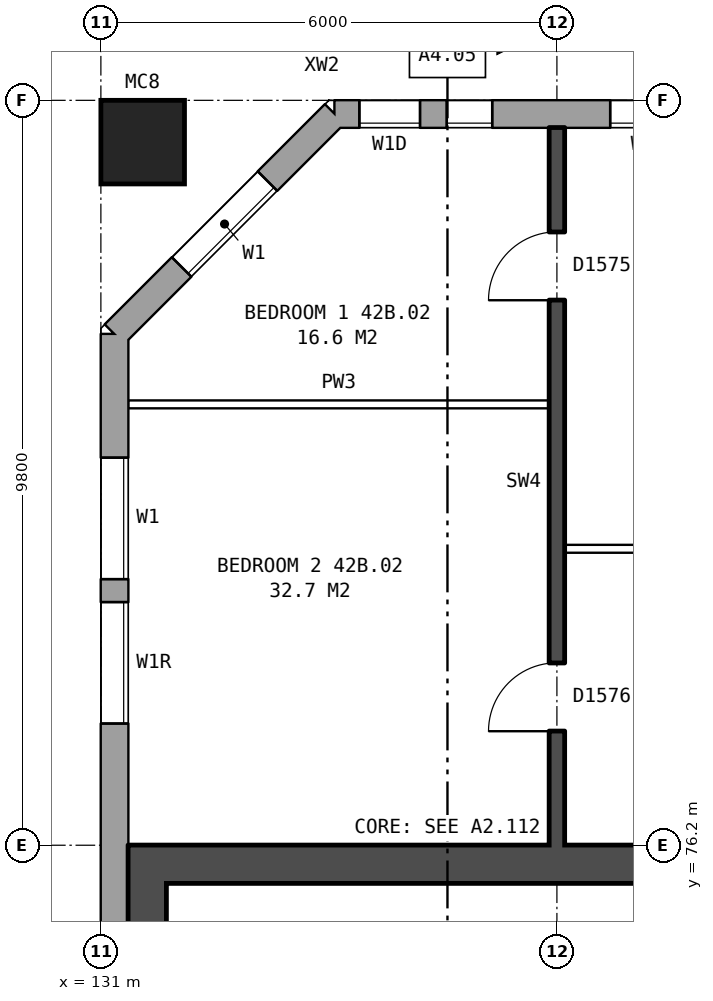
"""IFC4 building model, lengths in metres.
Left out: names, types, materials, properties, quantities, classifications, styles, units other than length and angle.
Written with IfcOpenShell. Run it as: python <this file> out.ifc"""

import sys

from ifc_helpers import new_model, si_unit, direction, frame, frame_2d, origin, origin_2d, place, context, subcontext, project, spatial, rectangle, hollow_rectangle, extrude, element, fill, save


model = new_model("IFC4")
c1 = context("Model", 3, precision=1e-05, world=origin(), true_north=direction((0.0, 1.0)))
c2 = subcontext(c1, "Body", "Model", "MODEL_VIEW")
j1 = project(units=[si_unit("LENGTHUNIT", "METRE"), si_unit("PLANEANGLEUNIT", "RADIAN")], contexts=[c1])
p1 = place(None, origin())
s1 = spatial("IfcSite", under=j1, at=p1, CompositionType="ELEMENT")
p2 = place(p1, origin())
s2 = spatial("IfcBuilding", under=s1, at=p2, CompositionType="ELEMENT")
p3 = place(p2, frame((0.0, 0.0, 151.6)))
s3 = spatial("IfcBuildingStorey", under=s2, at=p3, CompositionType="ELEMENT", Elevation=151.6)
p4 = place(p3, frame((131.55, 85.45, 0.0), z_axis=(0.0, 0.0, 1.0), x_axis=(1.0, 0.0, 0.0)))
e1 = element("IfcColumn", 1, at=p4, inside=s3, PredefinedType="COLUMN", context=c2, shape_type="SweptSolid", body=[
    extrude(hollow_rectangle(XDim=1.1, YDim=1.1, WallThickness=0.06, at=origin_2d()), origin(), (0.0, 0.0, 1.0), 3.1),
])
p5 = place(p3, frame((168.425, 85.82, 0.0), z_axis=(0.0, 0.0, 1.0), x_axis=(-1.0, 0.0, 0.0)))
e2 = element("IfcWall", 2, at=p5, inside=s3, PredefinedType="STANDARD", context=c2, shape_type="SweptSolid", body=[
    extrude(rectangle(XDim=34.351, YDim=0.36, at=frame_2d((17.175, 0.0))), origin(), (0.0, 0.0, 1.0), 2.85),
])
p6 = place(p5, frame((3.225, 0.0, 0.8)))
e3 = element("IfcOpeningElement", 3, at=p6, cuts=e2, PredefinedType="OPENING", context=c2, shape_type="SweptSolid", body=[
    extrude(rectangle(XDim=0.6, YDim=0.9, at=frame_2d((0.3, 0.45))), frame((0.0, 0.19, 0.0), z_axis=(0.0, -1.0, 0.0), x_axis=(1.0, 0.0, 0.0)), (0.0, 0.0, 1.0), 0.38),
])
p7 = place(p5, frame((5.125, 0.0, 0.8)))
e4 = element("IfcOpeningElement", 4, at=p7, cuts=e2, PredefinedType="OPENING", context=c2, shape_type="SweptSolid", body=[
    extrude(rectangle(XDim=1.6, YDim=1.8, at=frame_2d((0.8, 0.9))), frame((0.0, 0.19, 0.0), z_axis=(0.0, -1.0, 0.0), x_axis=(1.0, 0.0, 0.0)), (0.0, 0.0, 1.0), 0.38),
])
p8 = place(p5, frame((8.125, 0.0, 0.8)))
e5 = element("IfcOpeningElement", 5, at=p8, cuts=e2, PredefinedType="OPENING", context=c2, shape_type="SweptSolid", body=[
    extrude(rectangle(XDim=1.6, YDim=1.8, at=frame_2d((0.8, 0.9))), frame((0.0, 0.19, 0.0), z_axis=(0.0, -1.0, 0.0), x_axis=(1.0, 0.0, 0.0)), (0.0, 0.0, 1.0), 0.38),
])
p9 = place(p5, frame((11.125, 0.0, 0.8)))
e6 = element("IfcOpeningElement", 6, at=p9, cuts=e2, PredefinedType="OPENING", context=c2, shape_type="SweptSolid", body=[
    extrude(rectangle(XDim=1.6, YDim=1.8, at=frame_2d((0.8, 0.9))), frame((0.0, 0.19, 0.0), z_axis=(0.0, -1.0, 0.0), x_axis=(1.0, 0.0, 0.0)), (0.0, 0.0, 1.0), 0.38),
])
p10 = place(p5, frame((14.125, 0.0, 0.8)))
e7 = element("IfcOpeningElement", 7, at=p10, cuts=e2, PredefinedType="OPENING", context=c2, shape_type="SweptSolid", body=[
    extrude(rectangle(XDim=1.6, YDim=1.8, at=frame_2d((0.8, 0.9))), frame((0.0, 0.19, 0.0), z_axis=(0.0, -1.0, 0.0), x_axis=(1.0, 0.0, 0.0)), (0.0, 0.0, 1.0), 0.38),
])
p11 = place(p5, frame((17.125, 0.0, 0.8)))
e8 = element("IfcOpeningElement", 8, at=p11, cuts=e2, PredefinedType="OPENING", context=c2, shape_type="SweptSolid", body=[
    extrude(rectangle(XDim=1.6, YDim=1.8, at=frame_2d((0.8, 0.9))), frame((0.0, 0.19, 0.0), z_axis=(0.0, -1.0, 0.0), x_axis=(1.0, 0.0, 0.0)), (0.0, 0.0, 1.0), 0.38),
])
p12 = place(p5, frame((20.125, 0.0, 0.8)))
e9 = element("IfcOpeningElement", 9, at=p12, cuts=e2, PredefinedType="OPENING", context=c2, shape_type="SweptSolid", body=[
    extrude(rectangle(XDim=1.6, YDim=1.8, at=frame_2d((0.8, 0.9))), frame((0.0, 0.19, 0.0), z_axis=(0.0, -1.0, 0.0), x_axis=(1.0, 0.0, 0.0)), (0.0, 0.0, 1.0), 0.38),
])
p13 = place(p5, frame((23.125, 0.0, 0.8)))
e10 = element("IfcOpeningElement", 10, at=p13, cuts=e2, PredefinedType="OPENING", context=c2, shape_type="SweptSolid", body=[
    extrude(rectangle(XDim=1.6, YDim=1.8, at=frame_2d((0.8, 0.9))), frame((0.0, 0.19, 0.0), z_axis=(0.0, -1.0, 0.0), x_axis=(1.0, 0.0, 0.0)), (0.0, 0.0, 1.0), 0.38),
])
p14 = place(p5, frame((26.125, 0.0, 0.8)))
e11 = element("IfcOpeningElement", 11, at=p14, cuts=e2, PredefinedType="OPENING", context=c2, shape_type="SweptSolid", body=[
    extrude(rectangle(XDim=1.6, YDim=1.8, at=frame_2d((0.8, 0.9))), frame((0.0, 0.19, 0.0), z_axis=(0.0, -1.0, 0.0), x_axis=(1.0, 0.0, 0.0)), (0.0, 0.0, 1.0), 0.38),
])
p15 = place(p5, frame((28.025, 0.0, 0.8)))
e12 = element("IfcOpeningElement", 12, at=p15, cuts=e2, PredefinedType="OPENING", context=c2, shape_type="SweptSolid", body=[
    extrude(rectangle(XDim=1.4, YDim=1.8, at=frame_2d((0.7, 0.9))), frame((0.0, 0.19, 0.0), z_axis=(0.0, -1.0, 0.0), x_axis=(1.0, 0.0, 0.0)), (0.0, 0.0, 1.0), 0.38),
])
p16 = place(p5, frame((32.275, 0.0, 1.7)))
e13 = element("IfcOpeningElement", 13, at=p16, cuts=e2, PredefinedType="OPENING", context=c2, shape_type="SweptSolid", body=[
    extrude(rectangle(XDim=0.6, YDim=0.9, at=frame_2d((0.3, 0.45))), frame((0.0, 0.19, 0.0), z_axis=(0.0, -1.0, 0.0), x_axis=(1.0, 0.0, 0.0)), (0.0, 0.0, 1.0), 0.38),
])
p17 = place(p5, frame((4.225, 0.0, 0.8)))
e14 = element("IfcOpeningElement", 14, at=p17, cuts=e2, PredefinedType="OPENING", context=c2, shape_type="SweptSolid", body=[
    extrude(rectangle(XDim=0.6, YDim=1.8, at=frame_2d((0.3, 0.9))), frame((0.0, 0.19, 0.0), z_axis=(0.0, -1.0, 0.0), x_axis=(1.0, 0.0, 0.0)), (0.0, 0.0, 1.0), 0.38),
])
p18 = place(p5, frame((29.725, 0.0, 0.8)))
e15 = element("IfcOpeningElement", 15, at=p18, cuts=e2, PredefinedType="OPENING", context=c2, shape_type="SweptSolid", body=[
    extrude(rectangle(XDim=1.0, YDim=1.2, at=frame_2d((0.5, 0.6))), frame((0.0, 0.19, 0.0), z_axis=(0.0, -1.0, 0.0), x_axis=(1.0, 0.0, 0.0)), (0.0, 0.0, 1.0), 0.38),
])
p19 = place(p5, frame((33.225, 0.0, 0.8)))
e16 = element("IfcOpeningElement", 16, at=p19, cuts=e2, PredefinedType="OPENING", context=c2, shape_type="SweptSolid", body=[
    extrude(rectangle(XDim=0.8, YDim=1.8, at=frame_2d((0.4, 0.9))), frame((0.0, 0.19, 0.0), z_axis=(0.0, -1.0, 0.0), x_axis=(1.0, 0.0, 0.0)), (0.0, 0.0, 1.0), 0.38),
])
p20 = place(p3, frame((134.075, 85.82, 0.0), z_axis=(0.0, 0.0, 1.0), x_axis=(-0.707106781187, -0.707106781187, 0.0)))
e17 = element("IfcWall", 17, at=p20, inside=s3, PredefinedType="STANDARD", context=c2, shape_type="SweptSolid", body=[
    extrude(rectangle(XDim=4.094, YDim=0.36, at=frame_2d((2.047, 0.0))), origin(), (0.0, 0.0, 1.0), 2.85),
])
p21 = place(p20, frame((1.247, 0.0, 0.8)))
e18 = element("IfcOpeningElement", 18, at=p21, cuts=e17, PredefinedType="OPENING", context=c2, shape_type="SweptSolid", body=[
    extrude(rectangle(XDim=1.6, YDim=1.8, at=frame_2d((0.8, 0.9))), frame((0.0, 0.19, 0.0), z_axis=(0.0, -1.0, 0.0), x_axis=(1.0, 0.0, 0.0)), (0.0, 0.0, 1.0), 0.38),
])
p22 = place(p3, frame((131.18, 82.925, 0.0), z_axis=(0.0, 0.0, 1.0), x_axis=(0.0, -1.0, 0.0)))
e19 = element("IfcWall", 19, at=p22, inside=s3, PredefinedType="STANDARD", context=c2, shape_type="SweptSolid", body=[
    extrude(rectangle(XDim=25.851, YDim=0.36, at=frame_2d((12.925, 0.0))), origin(), (0.0, 0.0, 1.0), 2.85),
])
p23 = place(p22, frame((1.625, 0.0, 0.8)))
e20 = element("IfcOpeningElement", 20, at=p23, cuts=e19, PredefinedType="OPENING", context=c2, shape_type="SweptSolid", body=[
    extrude(rectangle(XDim=1.6, YDim=1.8, at=frame_2d((0.8, 0.9))), frame((0.0, 0.19, 0.0), z_axis=(0.0, -1.0, 0.0), x_axis=(1.0, 0.0, 0.0)), (0.0, 0.0, 1.0), 0.38),
])
p24 = place(p22, frame((3.525, 0.0, 1.7)))
e21 = element("IfcOpeningElement", 21, at=p24, cuts=e19, PredefinedType="OPENING", context=c2, shape_type="SweptSolid", body=[
    extrude(rectangle(XDim=1.6, YDim=0.9, at=frame_2d((0.8, 0.45))), frame((0.0, 0.19, 0.0), z_axis=(0.0, -1.0, 0.0), x_axis=(1.0, 0.0, 0.0)), (0.0, 0.0, 1.0), 0.38),
])
p25 = place(p22, frame((20.725, 0.0, 1.7)))
e22 = element("IfcOpeningElement", 22, at=p25, cuts=e19, PredefinedType="OPENING", context=c2, shape_type="SweptSolid", body=[
    extrude(rectangle(XDim=1.6, YDim=0.9, at=frame_2d((0.8, 0.45))), frame((0.0, 0.19, 0.0), z_axis=(0.0, -1.0, 0.0), x_axis=(1.0, 0.0, 0.0)), (0.0, 0.0, 1.0), 0.38),
])
p26 = place(p22, frame((22.625, 0.0, 0.8)))
e23 = element("IfcOpeningElement", 23, at=p26, cuts=e19, PredefinedType="OPENING", context=c2, shape_type="SweptSolid", body=[
    extrude(rectangle(XDim=1.6, YDim=1.8, at=frame_2d((0.8, 0.9))), frame((0.0, 0.19, 0.0), z_axis=(0.0, -1.0, 0.0), x_axis=(1.0, 0.0, 0.0)), (0.0, 0.0, 1.0), 0.38),
])
p27 = place(p3, frame((131.61, 63.8, 0.0), z_axis=(0.0, 0.0, 1.0), x_axis=(0.0, 1.0, 0.0)))
e24 = element("IfcWall", 24, at=p27, inside=s3, PredefinedType="SHEAR", context=c2, shape_type="SweptSolid", body=[
    extrude(rectangle(XDim=12.4, YDim=0.5, at=frame_2d((6.2, 0.0))), origin(), (0.0, 0.0, 1.0), 2.85),
])
p28 = place(p3, frame((139.26, 75.95, 0.0), z_axis=(0.0, 0.0, 1.0), x_axis=(-1.0, 0.0, 0.0)))
e25 = element("IfcWall", 25, at=p28, inside=s3, PredefinedType="SHEAR", context=c2, shape_type="SweptSolid", body=[
    extrude(rectangle(XDim=7.4, YDim=0.5, at=frame_2d((3.7, 0.0))), origin(), (0.0, 0.0, 1.0), 2.85),
])
p29 = place(p3, frame((137.1, 80.1, 0.0), z_axis=(0.0, 0.0, 1.0), x_axis=(1.0, 0.0, 0.0)))
e26 = element("IfcWall", 26, at=p29, inside=s3, PredefinedType="PARTITIONING", context=c2, shape_type="SweptSolid", body=[
    extrude(rectangle(XDim=5.8, YDim=0.1, at=frame_2d((2.9, 0.0))), origin(), (0.0, 0.0, 1.0), 2.85),
])
p30 = place(p29, frame((1.3, 0.0, 0.0)))
e27 = element("IfcOpeningElement", 27, at=p30, cuts=e26, PredefinedType="OPENING", context=c2, shape_type="SweptSolid", body=[
    extrude(rectangle(XDim=0.9, YDim=2.1, at=frame_2d((0.45, 1.05))), frame((0.0, 0.06, 0.0), z_axis=(0.0, -1.0, 0.0), x_axis=(1.0, 0.0, 0.0)), (0.0, 0.0, 1.0), 0.12),
])
p31 = place(p29, frame((4.2, 0.0, 0.0)))
e28 = element("IfcOpeningElement", 28, at=p31, cuts=e26, PredefinedType="OPENING", context=c2, shape_type="SweptSolid", body=[
    extrude(rectangle(XDim=0.9, YDim=2.1, at=frame_2d((0.45, 1.05))), frame((0.0, 0.06, 0.0), z_axis=(0.0, -1.0, 0.0), x_axis=(1.0, 0.0, 0.0)), (0.0, 0.0, 1.0), 0.12),
])
p32 = place(p3, frame((131.36, 82.0, 0.0), z_axis=(0.0, 0.0, 1.0), x_axis=(1.0, 0.0, 0.0)))
e29 = element("IfcWall", 29, at=p32, inside=s3, PredefinedType="PARTITIONING", context=c2, shape_type="SweptSolid", body=[
    extrude(rectangle(XDim=5.54, YDim=0.1, at=frame_2d((2.77, 0.0))), origin(), (0.0, 0.0, 1.0), 2.85),
])
p33 = place(p3, frame((137.0, 76.2, 0.0), z_axis=(0.0, 0.0, 1.0), x_axis=(0.0, 1.0, 0.0)))
e30 = element("IfcWall", 30, at=p33, inside=s3, PredefinedType="SOLIDWALL", context=c2, shape_type="SweptSolid", body=[
    extrude(rectangle(XDim=9.44, YDim=0.2, at=frame_2d((4.72, 0.0))), origin(), (0.0, 0.0, 1.0), 2.85),
])
p34 = place(p33, frame((7.17, 0.0, 0.0)))
e31 = element("IfcOpeningElement", 31, at=p34, cuts=e30, PredefinedType="OPENING", context=c2, shape_type="SweptSolid", body=[
    extrude(rectangle(XDim=0.9, YDim=2.1, at=frame_2d((0.45, 1.05))), frame((0.0, 0.11, 0.0), z_axis=(0.0, -1.0, 0.0), x_axis=(1.0, 0.0, 0.0)), (0.0, 0.0, 1.0), 0.22),
])
p35 = place(p33, frame((1.5, 0.0, 0.0)))
e32 = element("IfcOpeningElement", 32, at=p35, cuts=e30, PredefinedType="OPENING", context=c2, shape_type="SweptSolid", body=[
    extrude(rectangle(XDim=0.9, YDim=2.1, at=frame_2d((0.45, 1.05))), frame((0.0, 0.11, 0.0), z_axis=(0.0, -1.0, 0.0), x_axis=(1.0, 0.0, 0.0)), (0.0, 0.0, 1.0), 0.22),
])
p36 = place(p16, origin())
e33 = element("IfcWindow", 33, at=p36, inside=s3, PartitioningType="SINGLE_PANEL", PredefinedType="WINDOW", context=c2, shape_type="SweptSolid", body=[
    extrude(rectangle(XDim=0.6, YDim=0.9, at=frame_2d((0.3, 0.45))), frame((0.0, 0.15, 0.0), z_axis=(0.0, -1.0, 0.0), x_axis=(1.0, 0.0, 0.0)), (0.0, 0.0, 1.0), 0.06),
])
fill(e13, e33)
p37 = place(p21, origin())
e34 = element("IfcWindow", 34, at=p37, inside=s3, PartitioningType="SINGLE_PANEL", PredefinedType="WINDOW", context=c2, shape_type="SweptSolid", body=[
    extrude(rectangle(XDim=1.6, YDim=1.8, at=frame_2d((0.8, 0.9))), frame((0.0, 0.15, 0.0), z_axis=(0.0, -1.0, 0.0), x_axis=(1.0, 0.0, 0.0)), (0.0, 0.0, 1.0), 0.06),
])
fill(e18, e34)
p38 = place(p23, origin())
e35 = element("IfcWindow", 35, at=p38, inside=s3, PartitioningType="SINGLE_PANEL", PredefinedType="WINDOW", context=c2, shape_type="SweptSolid", body=[
    extrude(rectangle(XDim=1.6, YDim=1.8, at=frame_2d((0.8, 0.9))), frame((0.0, 0.15, 0.0), z_axis=(0.0, -1.0, 0.0), x_axis=(1.0, 0.0, 0.0)), (0.0, 0.0, 1.0), 0.06),
])
fill(e20, e35)
p39 = place(p24, origin())
e36 = element("IfcWindow", 36, at=p39, inside=s3, PartitioningType="SINGLE_PANEL", PredefinedType="WINDOW", context=c2, shape_type="SweptSolid", body=[
    extrude(rectangle(XDim=1.6, YDim=0.9, at=frame_2d((0.8, 0.45))), frame((0.0, 0.15, 0.0), z_axis=(0.0, -1.0, 0.0), x_axis=(1.0, 0.0, 0.0)), (0.0, 0.0, 1.0), 0.06),
])
fill(e21, e36)
p40 = place(p34, origin())
e37 = element("IfcDoor", 37, at=p40, inside=s3, OperationType="SINGLE_SWING_LEFT", PredefinedType="DOOR", context=c2, shape_type="SweptSolid", body=[
    extrude(rectangle(XDim=0.9, YDim=2.1, at=frame_2d((0.45, 1.05))), frame((0.0, 0.025, 0.0), z_axis=(0.0, -1.0, 0.0), x_axis=(1.0, 0.0, 0.0)), (0.0, 0.0, 1.0), 0.05),
])
fill(e31, e37)
p41 = place(p35, origin())
e38 = element("IfcDoor", 38, at=p41, inside=s3, OperationType="SINGLE_SWING_LEFT", PredefinedType="DOOR", context=c2, shape_type="SweptSolid", body=[
    extrude(rectangle(XDim=0.9, YDim=2.1, at=frame_2d((0.45, 1.05))), frame((0.0, 0.025, 0.0), z_axis=(0.0, -1.0, 0.0), x_axis=(1.0, 0.0, 0.0)), (0.0, 0.0, 1.0), 0.05),
])
fill(e32, e38)
p42 = place(p18, origin())
e39 = element("IfcWindow", 39, at=p42, inside=s3, PartitioningType="SINGLE_PANEL", PredefinedType="WINDOW", context=c2, shape_type="SweptSolid", body=[
    extrude(rectangle(XDim=1.0, YDim=1.2, at=frame_2d((0.5, 0.6))), frame((0.0, 0.15, 0.0), z_axis=(0.0, -1.0, 0.0), x_axis=(1.0, 0.0, 0.0)), (0.0, 0.0, 1.0), 0.06),
])
fill(e15, e39)
p43 = place(p19, origin())
e40 = element("IfcWindow", 40, at=p43, inside=s3, PartitioningType="SINGLE_PANEL", PredefinedType="WINDOW", context=c2, shape_type="SweptSolid", body=[
    extrude(rectangle(XDim=0.8, YDim=1.8, at=frame_2d((0.4, 0.9))), frame((0.0, 0.15, 0.0), z_axis=(0.0, -1.0, 0.0), x_axis=(1.0, 0.0, 0.0)), (0.0, 0.0, 1.0), 0.06),
])
fill(e16, e40)
save(model, sys.argv[1])
